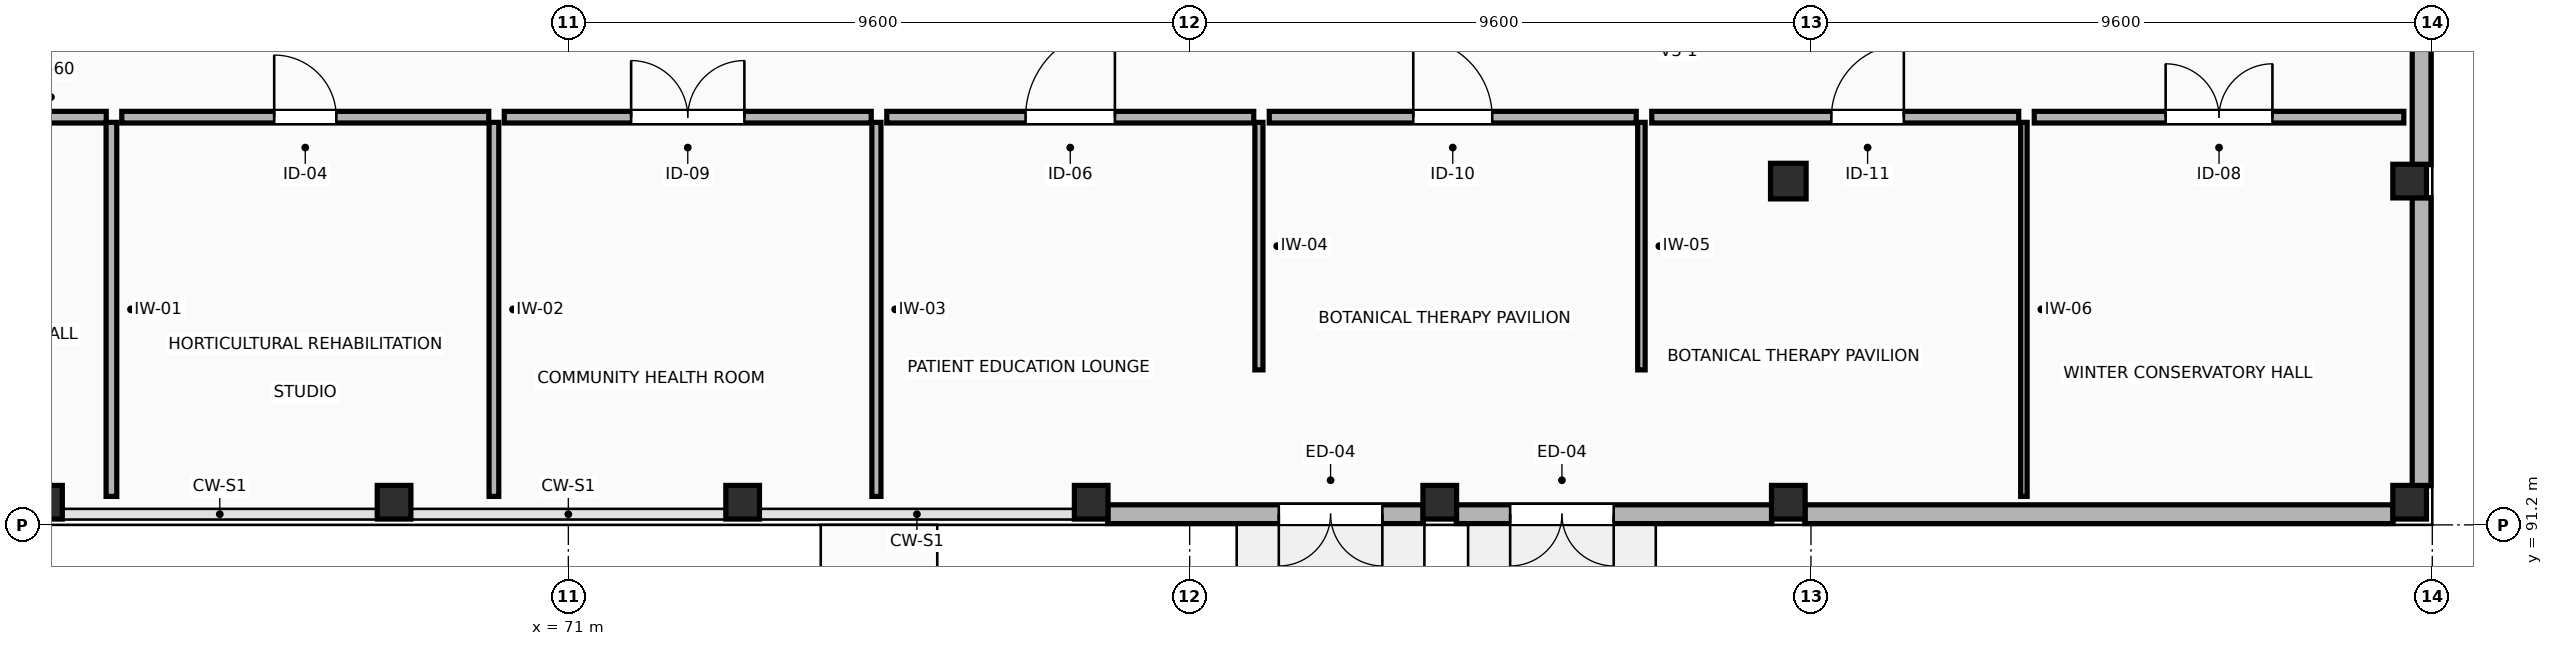
"""IFC4 building model, lengths in metres.
Left out: names, types, materials, properties, quantities, classifications, styles, units other than length and angle.
Written with IfcOpenShell. Run it as: python <this file> out.ifc"""

import sys

from ifc_helpers import new_model, si_unit, direction, frame, frame_2d, origin, origin_2d, place, context, subcontext, project, spatial, rectangle, circle, extrude, element, fill, save


model = new_model("IFC4")
c1 = context("Model", 3, precision=1e-05, world=origin(), true_north=direction((0.0, 1.0)))
c2 = subcontext(c1, "Body", "Model", "MODEL_VIEW")
j1 = project(units=[si_unit("LENGTHUNIT", "METRE"), si_unit("PLANEANGLEUNIT", "RADIAN")], contexts=[c1])
p1 = place(None, origin())
s1 = spatial("IfcSite", under=j1, at=p1, CompositionType="ELEMENT")
p2 = place(p1, origin())
s2 = spatial("IfcBuilding", under=s1, at=p2, CompositionType="ELEMENT")
p3 = place(p2, origin())
s3 = spatial("IfcBuildingStorey", under=s2, at=p3, CompositionType="ELEMENT", Elevation=0.0)
for number, where, z_axis, x_axis in (
    (1, (62.921, 91.55, -1.75), (0.0, 0.0, 1.0), (1.0, 0.0, 0.0)),
    (2, (68.307, 91.55, -1.75), (0.0, 0.0, 1.0), (1.0, 0.0, 0.0)),
    (3, (73.693, 91.55, -1.75), (0.0, 0.0, 1.0), (1.0, 0.0, 0.0)),
    (4, (79.079, 91.55, -1.75), (0.0, 0.0, 1.0), (1.0, 0.0, 0.0)),
    (5, (84.464, 91.55, -1.75), (0.0, 0.0, 1.0), (1.0, 0.0, 0.0)),
    (6, (89.85, 91.55, -1.75), (0.0, 0.0, 1.0), (1.0, 0.0, 0.0)),
):
    element("IfcColumn", number, at=place(p3, frame(where, z_axis=z_axis, x_axis=x_axis)), inside=s3, PredefinedType="COLUMN", context=c2, shape_type="SweptSolid", body=[
        extrude(circle(Radius=0.26, at=origin_2d()), origin(), (0.0, 0.0, 1.0), 7.15),
    ])
p4 = place(p3, frame((89.85, 96.512, -1.75), z_axis=(0.0, 0.0, 1.0), x_axis=(1.0, 0.0, 0.0)))
e7 = element("IfcColumn", 7, at=p4, inside=s3, PredefinedType="COLUMN", context=c2, shape_type="SweptSolid", body=[
    extrude(rectangle(XDim=0.55, YDim=0.55, at=origin_2d()), origin(), (0.0, 0.0, 1.0), 7.15),
])
for number, where, z_axis, x_axis in (
    (8, (99.45, 91.55, -1.75), (0.0, 0.0, 1.0), (1.0, 0.0, 0.0)),
    (9, (99.45, 96.512, -1.75), (0.0, 0.0, 1.0), (1.0, 0.0, 0.0)),
):
    element("IfcColumn", number, at=place(p3, frame(where, z_axis=z_axis, x_axis=x_axis)), inside=s3, PredefinedType="COLUMN", context=c2, shape_type="SweptSolid", body=[
        extrude(circle(Radius=0.26, at=origin_2d()), origin(), (0.0, 0.0, 1.0), 7.15),
    ])
p5 = place(p3, frame((79.333, 91.365, 0.0), z_axis=(0.0, 0.0, 1.0), x_axis=(1.0, 0.0, 0.0)))
e10 = element("IfcWall", 10, at=p5, inside=s3, PredefinedType="STANDARD", context=c2, shape_type="SweptSolid", body=[
    extrude(rectangle(XDim=4.876, YDim=0.29, at=frame_2d((2.438, 0.0))), origin(), (0.0, 0.0, 1.0), 5.125),
])
p6 = place(p5, frame((2.644, 0.0, 0.0)))
e11 = element("IfcOpeningElement", 11, at=p6, cuts=e10, PredefinedType="OPENING", context=c2, shape_type="SweptSolid", body=[
    extrude(rectangle(XDim=1.6, YDim=2.25, at=frame_2d((0.8, 1.125))), frame((0.0, 0.155, 0.0), z_axis=(0.0, -1.0, 0.0), x_axis=(1.0, 0.0, 0.0)), (0.0, 0.0, 1.0), 0.31),
])
p7 = place(p3, frame((84.719, 91.365, 0.0), z_axis=(0.0, 0.0, 1.0), x_axis=(1.0, 0.0, 0.0)))
e12 = element("IfcWall", 12, at=p7, inside=s3, PredefinedType="STANDARD", context=c2, shape_type="SweptSolid", body=[
    extrude(rectangle(XDim=4.876, YDim=0.29, at=frame_2d((2.438, 0.0))), origin(), (0.0, 0.0, 1.0), 4.265),
])
p8 = place(p7, frame((0.833, 0.0, 0.0)))
e13 = element("IfcOpeningElement", 13, at=p8, cuts=e12, PredefinedType="OPENING", context=c2, shape_type="SweptSolid", body=[
    extrude(rectangle(XDim=1.6, YDim=2.25, at=frame_2d((0.8, 1.125))), frame((0.0, 0.155, 0.0), z_axis=(0.0, -1.0, 0.0), x_axis=(1.0, 0.0, 0.0)), (0.0, 0.0, 1.0), 0.31),
])
p9 = place(p3, frame((90.105, 91.365, 0.0), z_axis=(0.0, 0.0, 1.0), x_axis=(1.0, 0.0, 0.0)))
e14 = element("IfcWall", 14, at=p9, inside=s3, PredefinedType="STANDARD", context=c2, shape_type="SweptSolid", body=[
    extrude(rectangle(XDim=9.09, YDim=0.29, at=frame_2d((4.545, 0.0))), origin(), (0.0, 0.0, 1.0), 4.39),
])
p10 = place(p3, frame((99.635, 91.805, 0.0), z_axis=(0.0, 0.0, 1.0), x_axis=(0.0, 1.0, 0.0)))
e15 = element("IfcWall", 15, at=p10, inside=s3, PredefinedType="STANDARD", context=c2, shape_type="SweptSolid", body=[
    extrude(rectangle(XDim=4.453, YDim=0.29, at=frame_2d((2.226, 0.0))), origin(), (0.0, 0.0, 1.0), 4.67),
])
p11 = place(p3, frame((99.635, 96.768, 0.0), z_axis=(0.0, 0.0, 1.0), x_axis=(0.0, 1.0, 0.0)))
e16 = element("IfcWall", 16, at=p11, inside=s3, PredefinedType="STANDARD", context=c2, shape_type="SweptSolid", body=[
    extrude(rectangle(XDim=4.452, YDim=0.29, at=frame_2d((2.226, 0.0))), origin(), (0.0, 0.0, 1.0), 4.67),
])
p12 = place(p3, frame((58.19, 97.5, 0.0), z_axis=(0.0, 0.0, 1.0), x_axis=(1.0, 0.0, 0.0)))
e17 = element("IfcWall", 17, at=p12, inside=s3, PredefinedType="PARTITIONING", context=c2, shape_type="SweptSolid", body=[
    extrude(rectangle(XDim=5.67, YDim=0.18, at=frame_2d((2.835, 0.0))), origin(), (0.0, 0.0, 1.0), 5.125),
])
p13 = place(p12, frame((2.01, 0.0, 0.0)))
e18 = element("IfcOpeningElement", 18, at=p13, cuts=e17, PredefinedType="OPENING", context=c2, shape_type="SweptSolid", body=[
    extrude(rectangle(XDim=1.65, YDim=2.3, at=frame_2d((0.825, 1.15))), frame((0.0, 0.1, 0.0), z_axis=(0.0, -1.0, 0.0), x_axis=(1.0, 0.0, 0.0)), (0.0, 0.0, 1.0), 0.2),
])
p14 = place(p3, frame((63.94, 97.42, 0.0), z_axis=(0.0, 0.0, 1.0), x_axis=(0.0, -1.0, 0.0)))
e19 = element("IfcWall", 19, at=p14, inside=s3, PredefinedType="PARTITIONING", context=c2, shape_type="SweptSolid", body=[
    extrude(rectangle(XDim=5.78, YDim=0.165, at=frame_2d((2.89, 0.0))), origin(), (0.0, 0.0, 1.0), 5.125),
])
p15 = place(p3, frame((64.1, 97.5, 0.0), z_axis=(0.0, 0.0, 1.0), x_axis=(1.0, 0.0, 0.0)))
e20 = element("IfcWall", 20, at=p15, inside=s3, PredefinedType="PARTITIONING", context=c2, shape_type="SweptSolid", body=[
    extrude(rectangle(XDim=5.67, YDim=0.18, at=frame_2d((2.835, 0.0))), origin(), (0.0, 0.0, 1.0), 5.125),
])
p16 = place(p15, frame((2.355, 0.0, 0.0)))
e21 = element("IfcOpeningElement", 21, at=p16, cuts=e20, PredefinedType="OPENING", context=c2, shape_type="SweptSolid", body=[
    extrude(rectangle(XDim=0.96, YDim=2.1, at=frame_2d((0.48, 1.05))), frame((0.0, 0.1, 0.0), z_axis=(0.0, -1.0, 0.0), x_axis=(1.0, 0.0, 0.0)), (0.0, 0.0, 1.0), 0.2),
])
p17 = place(p3, frame((69.85, 97.42, 0.0), z_axis=(0.0, 0.0, 1.0), x_axis=(0.0, -1.0, 0.0)))
e22 = element("IfcWall", 22, at=p17, inside=s3, PredefinedType="PARTITIONING", context=c2, shape_type="SweptSolid", body=[
    extrude(rectangle(XDim=5.78, YDim=0.15, at=frame_2d((2.89, 0.0))), origin(), (0.0, 0.0, 1.0), 5.125),
])
p18 = place(p3, frame((70.01, 97.5, 0.0), z_axis=(0.0, 0.0, 1.0), x_axis=(1.0, 0.0, 0.0)))
e23 = element("IfcWall", 23, at=p18, inside=s3, PredefinedType="PARTITIONING", context=c2, shape_type="SweptSolid", body=[
    extrude(rectangle(XDim=5.67, YDim=0.18, at=frame_2d((2.835, 0.0))), origin(), (0.0, 0.0, 1.0), 5.125),
])
p19 = place(p18, frame((1.96, 0.0, 0.0)))
e24 = element("IfcOpeningElement", 24, at=p19, cuts=e23, PredefinedType="OPENING", context=c2, shape_type="SweptSolid", body=[
    extrude(rectangle(XDim=1.75, YDim=2.35, at=frame_2d((0.875, 1.175))), frame((0.0, 0.1, 0.0), z_axis=(0.0, -1.0, 0.0), x_axis=(1.0, 0.0, 0.0)), (0.0, 0.0, 1.0), 0.2),
])
p20 = place(p3, frame((75.76, 97.42, 0.0), z_axis=(0.0, 0.0, 1.0), x_axis=(0.0, -1.0, 0.0)))
e25 = element("IfcWall", 25, at=p20, inside=s3, PredefinedType="PARTITIONING", context=c2, shape_type="SweptSolid", body=[
    extrude(rectangle(XDim=5.78, YDim=0.14, at=frame_2d((2.89, 0.0))), origin(), (0.0, 0.0, 1.0), 5.125),
])
p21 = place(p3, frame((75.92, 97.5, 0.0), z_axis=(0.0, 0.0, 1.0), x_axis=(1.0, 0.0, 0.0)))
e26 = element("IfcWall", 26, at=p21, inside=s3, PredefinedType="PARTITIONING", context=c2, shape_type="SweptSolid", body=[
    extrude(rectangle(XDim=5.67, YDim=0.18, at=frame_2d((2.835, 0.0))), origin(), (0.0, 0.0, 1.0), 5.125),
])
p22 = place(p21, frame((2.145, 0.0, 0.0)))
e27 = element("IfcOpeningElement", 27, at=p22, cuts=e26, PredefinedType="OPENING", context=c2, shape_type="SweptSolid", body=[
    extrude(rectangle(XDim=1.38, YDim=2.25, at=frame_2d((0.69, 1.125))), frame((0.0, 0.1, 0.0), z_axis=(0.0, -1.0, 0.0), x_axis=(1.0, 0.0, 0.0)), (0.0, 0.0, 1.0), 0.2),
])
p23 = place(p3, frame((81.67, 97.42, 0.0), z_axis=(0.0, 0.0, 1.0), x_axis=(0.0, -1.0, 0.0)))
e28 = element("IfcWall", 28, at=p23, inside=s3, PredefinedType="PARTITIONING", context=c2, shape_type="SweptSolid", body=[
    extrude(rectangle(XDim=3.825, YDim=0.125, at=frame_2d((1.913, 0.0))), origin(), (0.0, 0.0, 1.0), 5.125),
])
p24 = place(p3, frame((81.83, 97.5, 0.0), z_axis=(0.0, 0.0, 1.0), x_axis=(1.0, 0.0, 0.0)))
e29 = element("IfcWall", 29, at=p24, inside=s3, PredefinedType="PARTITIONING", context=c2, shape_type="SweptSolid", body=[
    extrude(rectangle(XDim=5.67, YDim=0.18, at=frame_2d((2.835, 0.0))), origin(), (0.0, 0.0, 1.0), 5.125),
])
p25 = place(p24, frame((2.225, 0.0, 0.0)))
e30 = element("IfcOpeningElement", 30, at=p25, cuts=e29, PredefinedType="OPENING", context=c2, shape_type="SweptSolid", body=[
    extrude(rectangle(XDim=1.22, YDim=2.18, at=frame_2d((0.61, 1.09))), frame((0.0, 0.1, 0.0), z_axis=(0.0, -1.0, 0.0), x_axis=(1.0, 0.0, 0.0)), (0.0, 0.0, 1.0), 0.2),
])
p26 = place(p3, frame((87.58, 97.42, 0.0), z_axis=(0.0, 0.0, 1.0), x_axis=(0.0, -1.0, 0.0)))
e31 = element("IfcWall", 31, at=p26, inside=s3, PredefinedType="PARTITIONING", context=c2, shape_type="SweptSolid", body=[
    extrude(rectangle(XDim=3.825, YDim=0.115, at=frame_2d((1.913, 0.0))), origin(), (0.0, 0.0, 1.0), 5.125),
])
p27 = place(p3, frame((87.74, 97.5, 0.0), z_axis=(0.0, 0.0, 1.0), x_axis=(1.0, 0.0, 0.0)))
e32 = element("IfcWall", 32, at=p27, inside=s3, PredefinedType="PARTITIONING", context=c2, shape_type="SweptSolid", body=[
    extrude(rectangle(XDim=5.67, YDim=0.18, at=frame_2d((2.835, 0.0))), origin(), (0.0, 0.0, 1.0), 5.125),
])
p28 = place(p27, frame((2.775, 0.0, 0.0)))
e33 = element("IfcOpeningElement", 33, at=p28, cuts=e32, PredefinedType="OPENING", context=c2, shape_type="SweptSolid", body=[
    extrude(rectangle(XDim=1.12, YDim=2.16, at=frame_2d((0.56, 1.08))), frame((0.0, 0.1, 0.0), z_axis=(0.0, -1.0, 0.0), x_axis=(1.0, 0.0, 0.0)), (0.0, 0.0, 1.0), 0.2),
])
p29 = place(p3, frame((93.49, 97.42, 0.0), z_axis=(0.0, 0.0, 1.0), x_axis=(0.0, -1.0, 0.0)))
e34 = element("IfcWall", 34, at=p29, inside=s3, PredefinedType="PARTITIONING", context=c2, shape_type="SweptSolid", body=[
    extrude(rectangle(XDim=5.78, YDim=0.1, at=frame_2d((2.89, 0.0))), origin(), (0.0, 0.0, 1.0), 5.125),
])
p30 = place(p3, frame((93.65, 97.5, 0.0), z_axis=(0.0, 0.0, 1.0), x_axis=(1.0, 0.0, 0.0)))
e35 = element("IfcWall", 35, at=p30, inside=s3, PredefinedType="PARTITIONING", context=c2, shape_type="SweptSolid", body=[
    extrude(rectangle(XDim=5.71, YDim=0.18, at=frame_2d((2.855, 0.0))), origin(), (0.0, 0.0, 1.0), 5.125),
])
p31 = place(p30, frame((2.03, 0.0, 0.0)))
e36 = element("IfcOpeningElement", 36, at=p31, cuts=e35, PredefinedType="OPENING", context=c2, shape_type="SweptSolid", body=[
    extrude(rectangle(XDim=1.65, YDim=2.3, at=frame_2d((0.825, 1.15))), frame((0.0, 0.1, 0.0), z_axis=(0.0, -1.0, 0.0), x_axis=(1.0, 0.0, 0.0)), (0.0, 0.0, 1.0), 0.2),
])
p32 = place(p6, frame((1.6, 0.0, 0.0), z_axis=(0.0, 0.0, 1.0), x_axis=(-1.0, 0.0, 0.0)))
e37 = element("IfcDoor", 37, at=p32, inside=s3, OperationType="DOUBLE_DOOR_SINGLE_SWING", PredefinedType="DOOR", context=c2, shape_type="SweptSolid", body=[
    extrude(rectangle(XDim=1.6, YDim=2.25, at=frame_2d((0.8, 1.125))), frame((0.0, 0.025, 0.0), z_axis=(0.0, -1.0, 0.0), x_axis=(1.0, 0.0, 0.0)), (0.0, 0.0, 1.0), 0.05),
])
fill(e11, e37)
p33 = place(p8, frame((1.6, 0.0, 0.0), z_axis=(0.0, 0.0, 1.0), x_axis=(-1.0, 0.0, 0.0)))
e38 = element("IfcDoor", 38, at=p33, inside=s3, OperationType="DOUBLE_DOOR_SINGLE_SWING", PredefinedType="DOOR", context=c2, shape_type="SweptSolid", body=[
    extrude(rectangle(XDim=1.6, YDim=2.25, at=frame_2d((0.8, 1.125))), frame((0.0, 0.025, 0.0), z_axis=(0.0, -1.0, 0.0), x_axis=(1.0, 0.0, 0.0)), (0.0, 0.0, 1.0), 0.05),
])
fill(e13, e38)
p34 = place(p16, origin())
e39 = element("IfcDoor", 39, at=p34, inside=s3, OperationType="SINGLE_SWING_LEFT", PredefinedType="DOOR", context=c2, shape_type="SweptSolid", body=[
    extrude(rectangle(XDim=0.96, YDim=2.1, at=frame_2d((0.48, 1.05))), frame((0.0, 0.025, 0.0), z_axis=(0.0, -1.0, 0.0), x_axis=(1.0, 0.0, 0.0)), (0.0, 0.0, 1.0), 0.05),
])
fill(e21, e39)
p35 = place(p19, origin())
e40 = element("IfcDoor", 40, at=p35, inside=s3, OperationType="DOUBLE_DOOR_SINGLE_SWING", PredefinedType="DOOR", context=c2, shape_type="SweptSolid", body=[
    extrude(rectangle(XDim=1.75, YDim=2.35, at=frame_2d((0.875, 1.175))), frame((0.0, 0.025, 0.0), z_axis=(0.0, -1.0, 0.0), x_axis=(1.0, 0.0, 0.0)), (0.0, 0.0, 1.0), 0.05),
])
fill(e24, e40)
p36 = place(p22, origin())
e41 = element("IfcDoor", 41, at=p36, inside=s3, OperationType="SINGLE_SWING_RIGHT", PredefinedType="DOOR", context=c2, shape_type="SweptSolid", body=[
    extrude(rectangle(XDim=1.38, YDim=2.25, at=frame_2d((0.69, 1.125))), frame((0.0, 0.025, 0.0), z_axis=(0.0, -1.0, 0.0), x_axis=(1.0, 0.0, 0.0)), (0.0, 0.0, 1.0), 0.05),
])
fill(e27, e41)
p37 = place(p25, origin())
e42 = element("IfcDoor", 42, at=p37, inside=s3, OperationType="SINGLE_SWING_LEFT", PredefinedType="DOOR", context=c2, shape_type="SweptSolid", body=[
    extrude(rectangle(XDim=1.22, YDim=2.18, at=frame_2d((0.61, 1.09))), frame((0.0, 0.025, 0.0), z_axis=(0.0, -1.0, 0.0), x_axis=(1.0, 0.0, 0.0)), (0.0, 0.0, 1.0), 0.05),
])
fill(e30, e42)
p38 = place(p28, origin())
e43 = element("IfcDoor", 43, at=p38, inside=s3, OperationType="SINGLE_SWING_RIGHT", PredefinedType="DOOR", context=c2, shape_type="SweptSolid", body=[
    extrude(rectangle(XDim=1.12, YDim=2.16, at=frame_2d((0.56, 1.08))), frame((0.0, 0.025, 0.0), z_axis=(0.0, -1.0, 0.0), x_axis=(1.0, 0.0, 0.0)), (0.0, 0.0, 1.0), 0.05),
])
fill(e33, e43)
p39 = place(p31, origin())
e44 = element("IfcDoor", 44, at=p39, inside=s3, OperationType="DOUBLE_DOOR_SINGLE_SWING", PredefinedType="DOOR", context=c2, shape_type="SweptSolid", body=[
    extrude(rectangle(XDim=1.65, YDim=2.3, at=frame_2d((0.825, 1.15))), frame((0.0, 0.025, 0.0), z_axis=(0.0, -1.0, 0.0), x_axis=(1.0, 0.0, 0.0)), (0.0, 0.0, 1.0), 0.05),
])
fill(e36, e44)
save(model, sys.argv[1])
